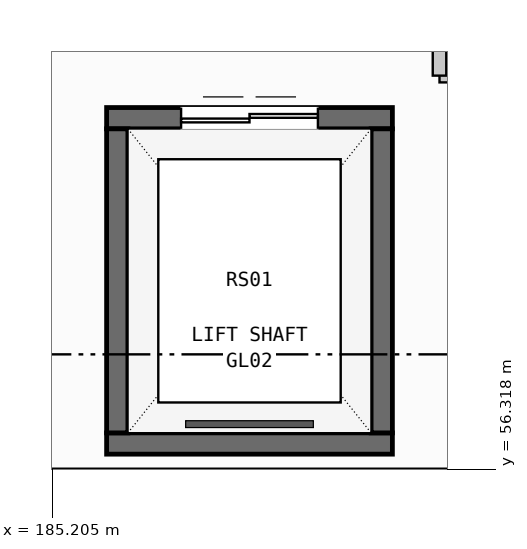
"""IFC4 building model, lengths in metres.
Left out: names, types, materials, properties, quantities, classifications, styles, units other than length and angle.
Written with IfcOpenShell. Run it as: python <this file> out.ifc"""

import sys

from ifc_helpers import new_model, si_unit, direction, frame, frame_2d, origin, place, context, subcontext, project, spatial, rectangle, extrude, element, fill, save


model = new_model("IFC4")
c1 = context("Model", 3, precision=1e-05, world=origin(), true_north=direction((0.0, 1.0)))
c2 = subcontext(c1, "Body", "Model", "MODEL_VIEW")
j1 = project(units=[si_unit("LENGTHUNIT", "METRE"), si_unit("PLANEANGLEUNIT", "RADIAN")], contexts=[c1])
p1 = place(None, origin())
s1 = spatial("IfcSite", under=j1, at=p1, CompositionType="ELEMENT")
p2 = place(p1, origin())
s2 = spatial("IfcBuilding", under=s1, at=p2, CompositionType="ELEMENT")
p3 = place(p2, frame((0.0, 0.0, 11.4)))
s3 = spatial("IfcBuildingStorey", under=s2, at=p3, CompositionType="ELEMENT", Elevation=11.4)
p4 = place(p3, frame((185.92, 56.66, 0.0), z_axis=(0.0, 0.0, 1.0), x_axis=(1.0, 0.0, 0.0)))
e1 = element("IfcWall", 1, at=p4, inside=s3, PredefinedType="SHEAR", context=c2, shape_type="SweptSolid", body=[
    extrude(rectangle(XDim=3.76, YDim=0.28, at=frame_2d((1.88, 0.0))), origin(), (0.0, 0.0, 1.0), 4.2),
])
p5 = place(p3, frame((185.92, 60.94, 0.0), z_axis=(0.0, 0.0, 1.0), x_axis=(1.0, 0.0, 0.0)))
e2 = element("IfcWall", 2, at=p5, inside=s3, PredefinedType="SHEAR", context=c2, shape_type="SweptSolid", body=[
    extrude(rectangle(XDim=3.76, YDim=0.28, at=frame_2d((1.88, 0.0))), origin(), (0.0, 0.0, 1.0), 4.2),
])
p6 = place(p5, frame((0.98, 0.0, 0.0)))
e3 = element("IfcOpeningElement", 3, at=p6, cuts=e2, PredefinedType="OPENING", context=c2, shape_type="SweptSolid", body=[
    extrude(rectangle(XDim=1.8, YDim=2.3, at=frame_2d((0.9, 1.15))), frame((0.0, 0.15, 0.0), z_axis=(0.0, -1.0, 0.0), x_axis=(1.0, 0.0, 0.0)), (0.0, 0.0, 1.0), 0.3),
])
for number, where, z_axis, x_axis in (
    (4, (186.06, 56.8, 0.0), (0.0, 0.0, 1.0), (0.0, 1.0, 0.0)),
    (5, (189.54, 56.8, 0.0), (0.0, 0.0, 1.0), (0.0, 1.0, 0.0)),
):
    element("IfcWall", number, at=place(p3, frame(where, z_axis=z_axis, x_axis=x_axis)), inside=s3, PredefinedType="SHEAR", context=c2, shape_type="SweptSolid", body=[
        extrude(rectangle(XDim=4.0, YDim=0.28, at=frame_2d((2.0, 0.0))), origin(), (0.0, 0.0, 1.0), 4.2),
    ])
p7 = place(p3, frame((190.3, 61.5, 0.0), z_axis=(0.0, 0.0, 1.0), x_axis=(1.0, 0.0, 0.0)))
e6 = element("IfcWall", 6, at=p7, inside=s3, PredefinedType="PARTITIONING", context=c2, shape_type="SweptSolid", body=[
    extrude(rectangle(XDim=13.1, YDim=0.178, at=frame_2d((6.55, 0.0))), origin(), (0.0, 0.0, 1.0), 4.4),
])
p8 = place(p3, frame((190.3, 61.5, 0.0), z_axis=(0.0, 0.0, 1.0), x_axis=(0.0, 1.0, 0.0)))
e7 = element("IfcWall", 7, at=p8, inside=s3, PredefinedType="PARTITIONING", context=c2, shape_type="SweptSolid", body=[
    extrude(rectangle(XDim=5.5, YDim=0.178, at=frame_2d((2.75, 0.0))), origin(), (0.0, 0.0, 1.0), 4.4),
])
p9 = place(p8, frame((2.22, 0.0, 0.0)))
e8 = element("IfcOpeningElement", 8, at=p9, cuts=e7, PredefinedType="OPENING", context=c2, shape_type="SweptSolid", body=[
    extrude(rectangle(XDim=1.06, YDim=2.18, at=frame_2d((0.53, 1.09))), frame((0.0, 0.099, 0.0), z_axis=(0.0, -1.0, 0.0), x_axis=(1.0, 0.0, 0.0)), (0.0, 0.0, 1.0), 0.198),
])
p10 = place(p6, origin())
e9 = element("IfcDoor", 9, at=p10, inside=s3, OperationType="DOUBLE_DOOR_SLIDING", PredefinedType="DOOR", context=c2, shape_type="SweptSolid", body=[
    extrude(rectangle(XDim=1.8, YDim=2.3, at=frame_2d((0.9, 1.15))), frame((0.0, 0.025, 0.0), z_axis=(0.0, -1.0, 0.0), x_axis=(1.0, 0.0, 0.0)), (0.0, 0.0, 1.0), 0.05),
])
fill(e3, e9)
save(model, sys.argv[1])
